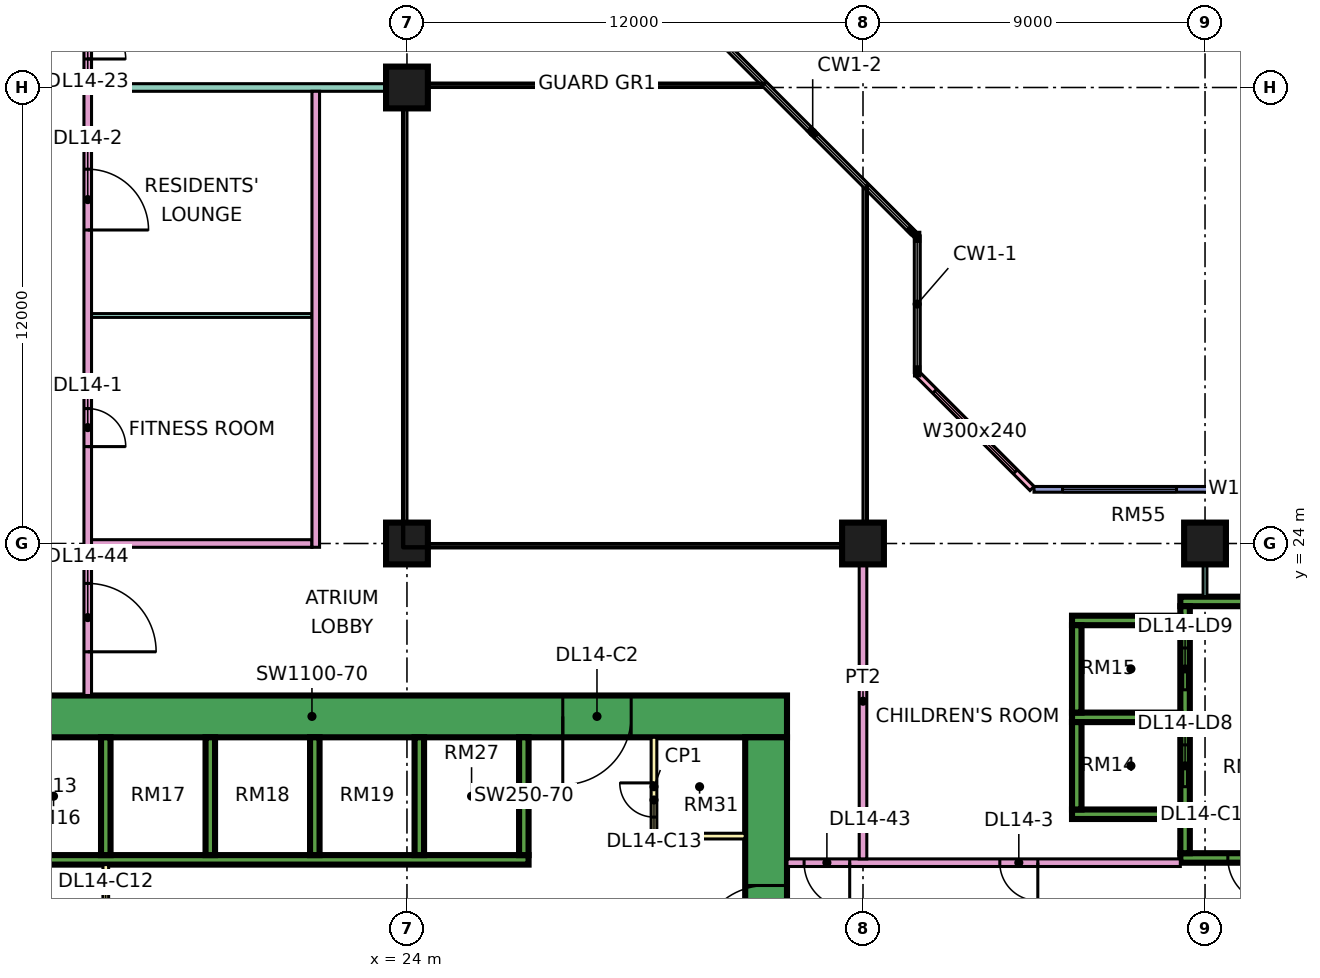
"""IFC4 building model, lengths in metres.
Left out: names, types, materials, properties, quantities, classifications, styles, units other than length and angle.
Written with IfcOpenShell. Run it as: python <this file> out.ifc"""

import sys

from ifc_helpers import new_model, si_unit, direction, frame, frame_2d, origin, origin_2d, place, context, subcontext, project, spatial, rectangle, extrude, element, fill, save


model = new_model("IFC4")
c1 = context("Model", 3, precision=1e-05, world=origin(), true_north=direction((0.0, 1.0)))
c2 = subcontext(c1, "Body", "Model", "MODEL_VIEW")
j1 = project(units=[si_unit("LENGTHUNIT", "METRE"), si_unit("PLANEANGLEUNIT", "RADIAN")], contexts=[c1])
p1 = place(None, origin())
s1 = spatial("IfcSite", under=j1, at=p1, CompositionType="ELEMENT")
p2 = place(p1, origin())
s2 = spatial("IfcBuilding", under=s1, at=p2, CompositionType="ELEMENT")
p3 = place(p2, frame((0.0, 0.0, 67.65)))
s3 = spatial("IfcBuildingStorey", under=s2, at=p3, CompositionType="ELEMENT", Elevation=67.65)
for number, where, z_axis, x_axis in (
    (1, (24.0, 24.0, 0.0), (0.0, 0.0, 1.0), (1.0, 0.0, 0.0)),
    (2, (24.0, 36.0, 0.0), (0.0, 0.0, 1.0), (1.0, 0.0, 0.0)),
    (3, (36.0, 24.0, 0.0), (0.0, 0.0, 1.0), (1.0, 0.0, 0.0)),
    (4, (45.0, 24.0, 0.0), (0.0, 0.0, 1.0), (1.0, 0.0, 0.0)),
):
    element("IfcColumn", number, at=place(p3, frame(where, z_axis=z_axis, x_axis=x_axis)), inside=s3, PredefinedType="COLUMN", context=c2, shape_type="SweptSolid", body=[
        extrude(rectangle(XDim=1.1, YDim=1.1, at=origin_2d()), origin(), (0.0, 0.0, 1.0), 3.75),
    ])
p4 = place(p3, frame((9.0, 19.45, 0.0), z_axis=(0.0, 0.0, 1.0), x_axis=(1.0, 0.0, 0.0)))
e5 = element("IfcWall", 5, at=p4, inside=s3, PredefinedType="SHEAR", context=c2, shape_type="SweptSolid", body=[
    extrude(rectangle(XDim=25.0, YDim=1.1, at=frame_2d((12.5, 0.0))), origin(), (0.0, 0.0, 1.0), 3.75),
])
p5 = place(p4, frame((19.1, 0.0, 0.0)))
e6 = element("IfcOpeningElement", 6, at=p5, cuts=e5, PredefinedType="OPENING", context=c2, shape_type="SweptSolid", body=[
    extrude(rectangle(XDim=1.8, YDim=2.4, at=frame_2d((0.9, 1.2))), frame((0.0, 0.56, 0.0), z_axis=(0.0, -1.0, 0.0), x_axis=(1.0, 0.0, 0.0)), (0.0, 0.0, 1.0), 1.12),
])
p6 = place(p3, frame((33.45, 8.1, 0.0), z_axis=(0.0, 0.0, 1.0), x_axis=(0.0, 1.0, 0.0)))
e7 = element("IfcWall", 7, at=p6, inside=s3, PredefinedType="SHEAR", context=c2, shape_type="SweptSolid", body=[
    extrude(rectangle(XDim=10.8, YDim=1.1, at=frame_2d((5.4, 0.0))), origin(), (0.0, 0.0, 1.0), 3.75),
])
p7 = place(p6, frame((5.1, 0.0, 0.0)))
e8 = element("IfcOpeningElement", 8, at=p7, cuts=e7, PredefinedType="OPENING", context=c2, shape_type="SweptSolid", body=[
    extrude(rectangle(XDim=1.8, YDim=2.4, at=frame_2d((0.9, 1.2))), frame((0.0, 0.56, 0.0), z_axis=(0.0, -1.0, 0.0), x_axis=(1.0, 0.0, 0.0)), (0.0, 0.0, 1.0), 1.12),
])
p8 = place(p3, frame((13.45, 15.675, 0.0), z_axis=(0.0, 0.0, 1.0), x_axis=(1.0, 0.0, 0.0)))
e9 = element("IfcWall", 9, at=p8, inside=s3, PredefinedType="SHEAR", context=c2, shape_type="SweptSolid", body=[
    extrude(rectangle(XDim=13.75, YDim=0.25, at=frame_2d((6.875, 0.0))), origin(), (0.0, 0.0, 1.0), 3.75),
])
for number, where, z_axis, x_axis in (
    (10, (16.075, 15.8, 0.0), (0.0, 0.0, 1.0), (0.0, 1.0, 0.0)),
    (11, (18.825, 15.8, 0.0), (0.0, 0.0, 1.0), (0.0, 1.0, 0.0)),
    (12, (21.575, 15.8, 0.0), (0.0, 0.0, 1.0), (0.0, 1.0, 0.0)),
    (13, (24.325, 15.8, 0.0), (0.0, 0.0, 1.0), (0.0, 1.0, 0.0)),
    (14, (27.075, 15.8, 0.0), (0.0, 0.0, 1.0), (0.0, 1.0, 0.0)),
):
    element("IfcWall", number, at=place(p3, frame(where, z_axis=z_axis, x_axis=x_axis)), inside=s3, PredefinedType="SHEAR", context=c2, shape_type="SweptSolid", body=[
        extrude(rectangle(XDim=3.1, YDim=0.25, at=frame_2d((1.55, 0.0))), origin(), (0.0, 0.0, 1.0), 3.75),
    ])
p9 = place(p3, frame((44.35, 15.725, 0.0), z_axis=(0.0, 0.0, 1.0), x_axis=(1.0, 0.0, 0.0)))
e15 = element("IfcWall", 15, at=p9, inside=s3, PredefinedType="SHEAR", context=c2, shape_type="SweptSolid", body=[
    extrude(rectangle(XDim=3.425, YDim=0.25, at=frame_2d((1.712, 0.0))), origin(), (0.0, 0.0, 1.0), 3.75),
])
p10 = place(p9, frame((1.25, 0.0, 0.0)))
e16 = element("IfcOpeningElement", 16, at=p10, cuts=e15, PredefinedType="OPENING", context=c2, shape_type="SweptSolid", body=[
    extrude(rectangle(XDim=1.2, YDim=2.2, at=frame_2d((0.6, 1.1))), frame((0.0, 0.135, 0.0), z_axis=(0.0, -1.0, 0.0), x_axis=(1.0, 0.0, 0.0)), (0.0, 0.0, 1.0), 0.27),
])
p11 = place(p3, frame((44.35, 22.475, 0.0), z_axis=(0.0, 0.0, 1.0), x_axis=(1.0, 0.0, 0.0)))
e17 = element("IfcWall", 17, at=p11, inside=s3, PredefinedType="SHEAR", context=c2, shape_type="SweptSolid", body=[
    extrude(rectangle(XDim=3.425, YDim=0.25, at=frame_2d((1.712, 0.0))), origin(), (0.0, 0.0, 1.0), 3.75),
])
p12 = place(p3, frame((44.475, 15.85, 0.0), z_axis=(0.0, 0.0, 1.0), x_axis=(0.0, 1.0, 0.0)))
e18 = element("IfcWall", 18, at=p12, inside=s3, PredefinedType="SHEAR", context=c2, shape_type="SweptSolid", body=[
    extrude(rectangle(XDim=6.5, YDim=0.25, at=frame_2d((3.25, 0.0))), origin(), (0.0, 0.0, 1.0), 3.75),
])
p13 = place(p12, frame((1.75, 0.0, 0.0)))
e19 = element("IfcOpeningElement", 19, at=p13, cuts=e18, PredefinedType="OPENING", context=c2, shape_type="SweptSolid", body=[
    extrude(rectangle(XDim=1.1, YDim=2.2, at=frame_2d((0.55, 1.1))), frame((0.0, 0.135, 0.0), z_axis=(0.0, -1.0, 0.0), x_axis=(1.0, 0.0, 0.0)), (0.0, 0.0, 1.0), 0.27),
])
p14 = place(p12, frame((4.3, 0.0, 0.0)))
e20 = element("IfcOpeningElement", 20, at=p14, cuts=e18, PredefinedType="OPENING", context=c2, shape_type="SweptSolid", body=[
    extrude(rectangle(XDim=1.1, YDim=2.2, at=frame_2d((0.55, 1.1))), frame((0.0, 0.135, 0.0), z_axis=(0.0, -1.0, 0.0), x_axis=(1.0, 0.0, 0.0)), (0.0, 0.0, 1.0), 0.27),
])
for number, where, z_axis, x_axis in (
    (21, (41.5, 16.875, 0.0), (0.0, 0.0, 1.0), (1.0, 0.0, 0.0)),
    (22, (41.5, 19.425, 0.0), (0.0, 0.0, 1.0), (1.0, 0.0, 0.0)),
    (23, (41.5, 21.975, 0.0), (0.0, 0.0, 1.0), (1.0, 0.0, 0.0)),
):
    element("IfcWall", number, at=place(p3, frame(where, z_axis=z_axis, x_axis=x_axis)), inside=s3, PredefinedType="SHEAR", context=c2, shape_type="SweptSolid", body=[
        extrude(rectangle(XDim=2.85, YDim=0.25, at=frame_2d((1.425, 0.0))), origin(), (0.0, 0.0, 1.0), 3.75),
    ])
for number, where, z_axis, x_axis in (
    (24, (41.625, 17.0, 0.0), (0.0, 0.0, 1.0), (0.0, 1.0, 0.0)),
    (25, (41.625, 19.55, 0.0), (0.0, 0.0, 1.0), (0.0, 1.0, 0.0)),
):
    element("IfcWall", number, at=place(p3, frame(where, z_axis=z_axis, x_axis=x_axis)), inside=s3, PredefinedType="SHEAR", context=c2, shape_type="SweptSolid", body=[
        extrude(rectangle(XDim=2.3, YDim=0.25, at=frame_2d((1.15, 0.0))), origin(), (0.0, 0.0, 1.0), 3.75),
    ])
p15 = place(p3, frame((47.925, 25.425, 0.0), z_axis=(0.0, 0.0, 1.0), x_axis=(-1.0, 0.0, 0.0)))
e26 = element("IfcWall", 26, at=p15, inside=s3, PredefinedType="SOLIDWALL", context=c2, shape_type="SweptSolid", body=[
    extrude(rectangle(XDim=7.425, YDim=0.15, at=frame_2d((3.712, 0.0))), origin(), (0.0, 0.0, 1.0), 3.35),
])
p16 = place(p15, frame((0.562, 0.0, 0.45)))
e27 = element("IfcOpeningElement", 27, at=p16, cuts=e26, PredefinedType="OPENING", context=c2, shape_type="SweptSolid", body=[
    extrude(rectangle(XDim=1.8, YDim=2.4, at=frame_2d((0.9, 1.2))), frame((0.0, 0.085, 0.0), z_axis=(0.0, -1.0, 0.0), x_axis=(1.0, 0.0, 0.0)), (0.0, 0.0, 1.0), 0.17),
])
p17 = place(p15, frame((3.675, 0.0, 0.45)))
e28 = element("IfcOpeningElement", 28, at=p17, cuts=e26, PredefinedType="OPENING", context=c2, shape_type="SweptSolid", body=[
    extrude(rectangle(XDim=3.0, YDim=2.4, at=frame_2d((1.5, 1.2))), frame((0.0, 0.085, 0.0), z_axis=(0.0, -1.0, 0.0), x_axis=(1.0, 0.0, 0.0)), (0.0, 0.0, 1.0), 0.17),
])
p18 = place(p3, frame((40.447, 25.447, 0.0), z_axis=(0.0, 0.0, 1.0), x_axis=(-0.707106781187, 0.707106781187, 0.0)))
e29 = element("IfcWall", 29, at=p18, inside=s3, PredefinedType="SOLIDWALL", context=c2, shape_type="SweptSolid", body=[
    extrude(rectangle(XDim=4.243, YDim=0.15, at=frame_2d((2.121, 0.0))), origin(), (0.0, 0.0, 1.0), 3.35),
])
p19 = place(p18, frame((0.621, 0.0, 0.45)))
e30 = element("IfcOpeningElement", 30, at=p19, cuts=e29, PredefinedType="OPENING", context=c2, shape_type="SweptSolid", body=[
    extrude(rectangle(XDim=3.0, YDim=2.4, at=frame_2d((1.5, 1.2))), frame((0.0, 0.085, 0.0), z_axis=(0.0, -1.0, 0.0), x_axis=(1.0, 0.0, 0.0)), (0.0, 0.0, 1.0), 0.17),
])
p20 = place(p3, frame((16.075, 11.45, 0.0), z_axis=(0.0, 0.0, 1.0), x_axis=(0.0, 1.0, 0.0)))
e31 = element("IfcWall", 31, at=p20, inside=s3, PredefinedType="PARTITIONING", context=c2, shape_type="SweptSolid", body=[
    extrude(rectangle(XDim=4.1, YDim=0.15, at=frame_2d((2.05, 0.0))), origin(), (0.0, 0.0, 1.0), 3.35),
])
p21 = place(p20, frame((1.15, 0.0, 0.0)))
e32 = element("IfcOpeningElement", 32, at=p21, cuts=e31, PredefinedType="OPENING", context=c2, shape_type="SweptSolid", body=[
    extrude(rectangle(XDim=1.8, YDim=2.4, at=frame_2d((0.9, 1.2))), frame((0.0, 0.085, 0.0), z_axis=(0.0, -1.0, 0.0), x_axis=(1.0, 0.0, 0.0)), (0.0, 0.0, 1.0), 0.17),
])
p22 = place(p3, frame((30.5, 16.3, 0.0), z_axis=(0.0, 0.0, 1.0), x_axis=(0.0, 1.0, 0.0)))
e33 = element("IfcWall", 33, at=p22, inside=s3, PredefinedType="PARTITIONING", context=c2, shape_type="SweptSolid", body=[
    extrude(rectangle(XDim=2.6, YDim=0.15, at=frame_2d((1.3, 0.0))), origin(), (0.0, 0.0, 1.0), 3.35),
])
p23 = place(p22, frame((0.5, 0.0, 0.0)))
e34 = element("IfcOpeningElement", 34, at=p23, cuts=e33, PredefinedType="OPENING", context=c2, shape_type="SweptSolid", body=[
    extrude(rectangle(XDim=0.9, YDim=2.1, at=frame_2d((0.45, 1.05))), frame((0.0, 0.085, 0.0), z_axis=(0.0, -1.0, 0.0), x_axis=(1.0, 0.0, 0.0)), (0.0, 0.0, 1.0), 0.17),
])
p24 = place(p3, frame((30.5, 16.3, 0.0), z_axis=(0.0, 0.0, 1.0), x_axis=(1.0, 0.0, 0.0)))
e35 = element("IfcWall", 35, at=p24, inside=s3, PredefinedType="PARTITIONING", context=c2, shape_type="SweptSolid", body=[
    extrude(rectangle(XDim=2.4, YDim=0.15, at=frame_2d((1.2, 0.0))), origin(), (0.0, 0.0, 1.0), 3.35),
])
p25 = place(p3, frame((15.6, 20.0, 0.0), z_axis=(0.0, 0.0, 1.0), x_axis=(0.0, 1.0, 0.0)))
e36 = element("IfcWall", 36, at=p25, inside=s3, PredefinedType="PARTITIONING", context=c2, shape_type="SweptSolid", body=[
    extrude(rectangle(XDim=27.775, YDim=0.2, at=frame_2d((13.887, 0.0))), origin(), (0.0, 0.0, 1.0), 3.35),
])
p26 = place(p25, frame((6.55, 0.0, 0.0)))
e37 = element("IfcOpeningElement", 37, at=p26, cuts=e36, PredefinedType="OPENING", context=c2, shape_type="SweptSolid", body=[
    extrude(rectangle(XDim=1.0, YDim=2.1, at=frame_2d((0.5, 1.05))), frame((0.0, 0.11, 0.0), z_axis=(0.0, -1.0, 0.0), x_axis=(1.0, 0.0, 0.0)), (0.0, 0.0, 1.0), 0.22),
])
p27 = place(p25, frame((12.25, 0.0, 0.0)))
e38 = element("IfcOpeningElement", 38, at=p27, cuts=e36, PredefinedType="OPENING", context=c2, shape_type="SweptSolid", body=[
    extrude(rectangle(XDim=1.6, YDim=2.1, at=frame_2d((0.8, 1.05))), frame((0.0, 0.11, 0.0), z_axis=(0.0, -1.0, 0.0), x_axis=(1.0, 0.0, 0.0)), (0.0, 0.0, 1.0), 0.22),
])
p28 = place(p25, frame((16.75, 0.0, 0.0)))
e39 = element("IfcOpeningElement", 39, at=p28, cuts=e36, PredefinedType="OPENING", context=c2, shape_type="SweptSolid", body=[
    extrude(rectangle(XDim=1.0, YDim=2.1, at=frame_2d((0.5, 1.05))), frame((0.0, 0.11, 0.0), z_axis=(0.0, -1.0, 0.0), x_axis=(1.0, 0.0, 0.0)), (0.0, 0.0, 1.0), 0.22),
])
p29 = place(p25, frame((1.15, 0.0, 0.0)))
e40 = element("IfcOpeningElement", 40, at=p29, cuts=e36, PredefinedType="OPENING", context=c2, shape_type="SweptSolid", body=[
    extrude(rectangle(XDim=1.8, YDim=2.1, at=frame_2d((0.9, 1.05))), frame((0.0, 0.11, 0.0), z_axis=(0.0, -1.0, 0.0), x_axis=(1.0, 0.0, 0.0)), (0.0, 0.0, 1.0), 0.22),
])
p30 = place(p25, frame((25.9, 0.0, 0.0)))
e41 = element("IfcOpeningElement", 41, at=p30, cuts=e36, PredefinedType="OPENING", context=c2, shape_type="SweptSolid", body=[
    extrude(rectangle(XDim=1.0, YDim=2.1, at=frame_2d((0.5, 1.05))), frame((0.0, 0.11, 0.0), z_axis=(0.0, -1.0, 0.0), x_axis=(1.0, 0.0, 0.0)), (0.0, 0.0, 1.0), 0.22),
])
p31 = place(p3, frame((15.7, 24.0, 0.0), z_axis=(0.0, 0.0, 1.0), x_axis=(1.0, 0.0, 0.0)))
e42 = element("IfcWall", 42, at=p31, inside=s3, PredefinedType="PARTITIONING", context=c2, shape_type="SweptSolid", body=[
    extrude(rectangle(XDim=5.8, YDim=0.2, at=frame_2d((2.9, 0.0))), origin(), (0.0, 0.0, 1.0), 3.35),
])
p32 = place(p3, frame((15.7, 30.0, 0.0), z_axis=(0.0, 0.0, 1.0), x_axis=(1.0, 0.0, 0.0)))
e43 = element("IfcWall", 43, at=p32, inside=s3, PredefinedType="PARTITIONING", context=c2, shape_type="SweptSolid", body=[
    extrude(rectangle(XDim=5.8, YDim=0.1, at=frame_2d((2.9, 0.0))), origin(), (0.0, 0.0, 1.0), 3.35),
])
p33 = place(p3, frame((15.7, 36.0, 0.0), z_axis=(0.0, 0.0, 1.0), x_axis=(1.0, 0.0, 0.0)))
e44 = element("IfcWall", 44, at=p33, inside=s3, PredefinedType="PARTITIONING", context=c2, shape_type="SweptSolid", body=[
    extrude(rectangle(XDim=8.3, YDim=0.2, at=frame_2d((4.15, 0.0))), origin(), (0.0, 0.0, 1.0), 3.35),
])
p34 = place(p3, frame((21.6, 23.9, 0.0), z_axis=(0.0, 0.0, 1.0), x_axis=(0.0, 1.0, 0.0)))
e45 = element("IfcWall", 45, at=p34, inside=s3, PredefinedType="PARTITIONING", context=c2, shape_type="SweptSolid", body=[
    extrude(rectangle(XDim=12.0, YDim=0.2, at=frame_2d((6.0, 0.0))), origin(), (0.0, 0.0, 1.0), 3.35),
])
p35 = place(p3, frame((34.0, 15.6, 0.0), z_axis=(0.0, 0.0, 1.0), x_axis=(1.0, 0.0, 0.0)))
e46 = element("IfcWall", 46, at=p35, inside=s3, PredefinedType="PARTITIONING", context=c2, shape_type="SweptSolid", body=[
    extrude(rectangle(XDim=10.35, YDim=0.2, at=frame_2d((5.175, 0.0))), origin(), (0.0, 0.0, 1.0), 3.35),
])
p36 = place(p35, frame((5.6, 0.0, 0.0)))
e47 = element("IfcOpeningElement", 47, at=p36, cuts=e46, PredefinedType="OPENING", context=c2, shape_type="SweptSolid", body=[
    extrude(rectangle(XDim=1.0, YDim=2.1, at=frame_2d((0.5, 1.05))), frame((0.0, 0.11, 0.0), z_axis=(0.0, -1.0, 0.0), x_axis=(1.0, 0.0, 0.0)), (0.0, 0.0, 1.0), 0.22),
])
p37 = place(p35, frame((0.45, 0.0, 0.0)))
e48 = element("IfcOpeningElement", 48, at=p37, cuts=e46, PredefinedType="OPENING", context=c2, shape_type="SweptSolid", body=[
    extrude(rectangle(XDim=1.2, YDim=2.1, at=frame_2d((0.6, 1.05))), frame((0.0, 0.11, 0.0), z_axis=(0.0, -1.0, 0.0), x_axis=(1.0, 0.0, 0.0)), (0.0, 0.0, 1.0), 0.22),
])
p38 = place(p3, frame((36.0, 15.7, 0.0), z_axis=(0.0, 0.0, 1.0), x_axis=(0.0, 1.0, 0.0)))
e49 = element("IfcWall", 49, at=p38, inside=s3, PredefinedType="PARTITIONING", context=c2, shape_type="SweptSolid", body=[
    extrude(rectangle(XDim=8.3, YDim=0.2, at=frame_2d((4.15, 0.0))), origin(), (0.0, 0.0, 1.0), 3.35),
])
p39 = place(p3, frame((45.0, 22.6, 0.0), z_axis=(0.0, 0.0, 1.0), x_axis=(0.0, 1.0, 0.0)))
e50 = element("IfcWall", 50, at=p39, inside=s3, PredefinedType="PARTITIONING", context=c2, shape_type="SweptSolid", body=[
    extrude(rectangle(XDim=1.4, YDim=0.1, at=frame_2d((0.7, 0.0))), origin(), (0.0, 0.0, 1.0), 3.35),
])
p40 = place(p16, origin())
e51 = element("IfcWindow", 51, at=p40, inside=s3, PartitioningType="SINGLE_PANEL", PredefinedType="WINDOW", context=c2, shape_type="SweptSolid", body=[
    extrude(rectangle(XDim=1.8, YDim=2.4, at=frame_2d((0.9, 1.2))), frame((0.0, 0.03, 0.0), z_axis=(0.0, -1.0, 0.0), x_axis=(1.0, 0.0, 0.0)), (0.0, 0.0, 1.0), 0.06),
])
fill(e27, e51)
p41 = place(p17, origin())
e52 = element("IfcWindow", 52, at=p41, inside=s3, PartitioningType="SINGLE_PANEL", PredefinedType="WINDOW", context=c2, shape_type="SweptSolid", body=[
    extrude(rectangle(XDim=3.0, YDim=2.4, at=frame_2d((1.5, 1.2))), frame((0.0, 0.03, 0.0), z_axis=(0.0, -1.0, 0.0), x_axis=(1.0, 0.0, 0.0)), (0.0, 0.0, 1.0), 0.06),
])
fill(e28, e52)
p42 = place(p19, origin())
e53 = element("IfcWindow", 53, at=p42, inside=s3, PartitioningType="SINGLE_PANEL", PredefinedType="WINDOW", context=c2, shape_type="SweptSolid", body=[
    extrude(rectangle(XDim=3.0, YDim=2.4, at=frame_2d((1.5, 1.2))), frame((0.0, 0.03, 0.0), z_axis=(0.0, -1.0, 0.0), x_axis=(1.0, 0.0, 0.0)), (0.0, 0.0, 1.0), 0.06),
])
fill(e30, e53)
p43 = place(p7, origin())
e54 = element("IfcDoor", 54, at=p43, inside=s3, OperationType="DOUBLE_DOOR_SINGLE_SWING", PredefinedType="DOOR", context=c2, shape_type="SweptSolid", body=[
    extrude(rectangle(XDim=1.8, YDim=2.4, at=frame_2d((0.9, 1.2))), frame((0.0, 0.025, 0.0), z_axis=(0.0, -1.0, 0.0), x_axis=(1.0, 0.0, 0.0)), (0.0, 0.0, 1.0), 0.05),
])
fill(e8, e54)
p44 = place(p5, frame((1.8, 0.0, 0.0), z_axis=(0.0, 0.0, 1.0), x_axis=(-1.0, 0.0, 0.0)))
e55 = element("IfcDoor", 55, at=p44, inside=s3, OperationType="DOUBLE_DOOR_SINGLE_SWING", PredefinedType="DOOR", context=c2, shape_type="SweptSolid", body=[
    extrude(rectangle(XDim=1.8, YDim=2.4, at=frame_2d((0.9, 1.2))), frame((0.0, 0.025, 0.0), z_axis=(0.0, -1.0, 0.0), x_axis=(1.0, 0.0, 0.0)), (0.0, 0.0, 1.0), 0.05),
])
fill(e6, e55)
p45 = place(p10, origin())
e56 = element("IfcDoor", 56, at=p45, inside=s3, OperationType="SINGLE_SWING_RIGHT", PredefinedType="DOOR", context=c2, shape_type="SweptSolid", body=[
    extrude(rectangle(XDim=1.2, YDim=2.2, at=frame_2d((0.6, 1.1))), frame((0.0, 0.025, 0.0), z_axis=(0.0, -1.0, 0.0), x_axis=(1.0, 0.0, 0.0)), (0.0, 0.0, 1.0), 0.05),
])
fill(e16, e56)
p46 = place(p13, origin())
e57 = element("IfcDoor", 57, at=p46, inside=s3, OperationType="DOUBLE_DOOR_SLIDING", PredefinedType="DOOR", context=c2, shape_type="SweptSolid", body=[
    extrude(rectangle(XDim=1.1, YDim=2.2, at=frame_2d((0.55, 1.1))), frame((0.0, 0.025, 0.0), z_axis=(0.0, -1.0, 0.0), x_axis=(1.0, 0.0, 0.0)), (0.0, 0.0, 1.0), 0.05),
])
fill(e19, e57)
p47 = place(p14, origin())
e58 = element("IfcDoor", 58, at=p47, inside=s3, OperationType="DOUBLE_DOOR_SLIDING", PredefinedType="DOOR", context=c2, shape_type="SweptSolid", body=[
    extrude(rectangle(XDim=1.1, YDim=2.2, at=frame_2d((0.55, 1.1))), frame((0.0, 0.025, 0.0), z_axis=(0.0, -1.0, 0.0), x_axis=(1.0, 0.0, 0.0)), (0.0, 0.0, 1.0), 0.05),
])
fill(e20, e58)
p48 = place(p23, frame((0.9, 0.0, 0.0), z_axis=(0.0, 0.0, 1.0), x_axis=(-1.0, 0.0, 0.0)))
e59 = element("IfcDoor", 59, at=p48, inside=s3, OperationType="SINGLE_SWING_RIGHT", PredefinedType="DOOR", context=c2, shape_type="SweptSolid", body=[
    extrude(rectangle(XDim=0.9, YDim=2.1, at=frame_2d((0.45, 1.05))), frame((0.0, 0.025, 0.0), z_axis=(0.0, -1.0, 0.0), x_axis=(1.0, 0.0, 0.0)), (0.0, 0.0, 1.0), 0.05),
])
fill(e34, e59)
p49 = place(p26, frame((1.0, 0.0, 0.0), z_axis=(0.0, 0.0, 1.0), x_axis=(-1.0, 0.0, 0.0)))
e60 = element("IfcDoor", 60, at=p49, inside=s3, OperationType="SINGLE_SWING_LEFT", PredefinedType="DOOR", context=c2, shape_type="SweptSolid", body=[
    extrude(rectangle(XDim=1.0, YDim=2.1, at=frame_2d((0.5, 1.05))), frame((0.0, 0.025, 0.0), z_axis=(0.0, -1.0, 0.0), x_axis=(1.0, 0.0, 0.0)), (0.0, 0.0, 1.0), 0.05),
])
fill(e37, e60)
p50 = place(p27, frame((1.6, 0.0, 0.0), z_axis=(0.0, 0.0, 1.0), x_axis=(-1.0, 0.0, 0.0)))
e61 = element("IfcDoor", 61, at=p50, inside=s3, OperationType="DOUBLE_DOOR_SINGLE_SWING", PredefinedType="DOOR", context=c2, shape_type="SweptSolid", body=[
    extrude(rectangle(XDim=1.6, YDim=2.1, at=frame_2d((0.8, 1.05))), frame((0.0, 0.025, 0.0), z_axis=(0.0, -1.0, 0.0), x_axis=(1.0, 0.0, 0.0)), (0.0, 0.0, 1.0), 0.05),
])
fill(e38, e61)
p51 = place(p36, origin())
e62 = element("IfcDoor", 62, at=p51, inside=s3, OperationType="SINGLE_SWING_RIGHT", PredefinedType="DOOR", context=c2, shape_type="SweptSolid", body=[
    extrude(rectangle(XDim=1.0, YDim=2.1, at=frame_2d((0.5, 1.05))), frame((0.0, 0.025, 0.0), z_axis=(0.0, -1.0, 0.0), x_axis=(1.0, 0.0, 0.0)), (0.0, 0.0, 1.0), 0.05),
])
fill(e47, e62)
p52 = place(p28, frame((1.0, 0.0, 0.0), z_axis=(0.0, 0.0, 1.0), x_axis=(-1.0, 0.0, 0.0)))
e63 = element("IfcDoor", 63, at=p52, inside=s3, OperationType="SINGLE_SWING_LEFT", PredefinedType="DOOR", context=c2, shape_type="SweptSolid", body=[
    extrude(rectangle(XDim=1.0, YDim=2.1, at=frame_2d((0.5, 1.05))), frame((0.0, 0.025, 0.0), z_axis=(0.0, -1.0, 0.0), x_axis=(1.0, 0.0, 0.0)), (0.0, 0.0, 1.0), 0.05),
])
fill(e39, e63)
p53 = place(p37, origin())
e64 = element("IfcDoor", 64, at=p53, inside=s3, OperationType="SINGLE_SWING_RIGHT", PredefinedType="DOOR", context=c2, shape_type="SweptSolid", body=[
    extrude(rectangle(XDim=1.2, YDim=2.1, at=frame_2d((0.6, 1.05))), frame((0.0, 0.025, 0.0), z_axis=(0.0, -1.0, 0.0), x_axis=(1.0, 0.0, 0.0)), (0.0, 0.0, 1.0), 0.05),
])
fill(e48, e64)
p54 = place(p29, frame((1.8, 0.0, 0.0), z_axis=(0.0, 0.0, 1.0), x_axis=(-1.0, 0.0, 0.0)))
e65 = element("IfcDoor", 65, at=p54, inside=s3, OperationType="DOUBLE_DOOR_SINGLE_SWING", PredefinedType="DOOR", context=c2, shape_type="SweptSolid", body=[
    extrude(rectangle(XDim=1.8, YDim=2.1, at=frame_2d((0.9, 1.05))), frame((0.0, 0.025, 0.0), z_axis=(0.0, -1.0, 0.0), x_axis=(1.0, 0.0, 0.0)), (0.0, 0.0, 1.0), 0.05),
])
fill(e40, e65)
save(model, sys.argv[1])
